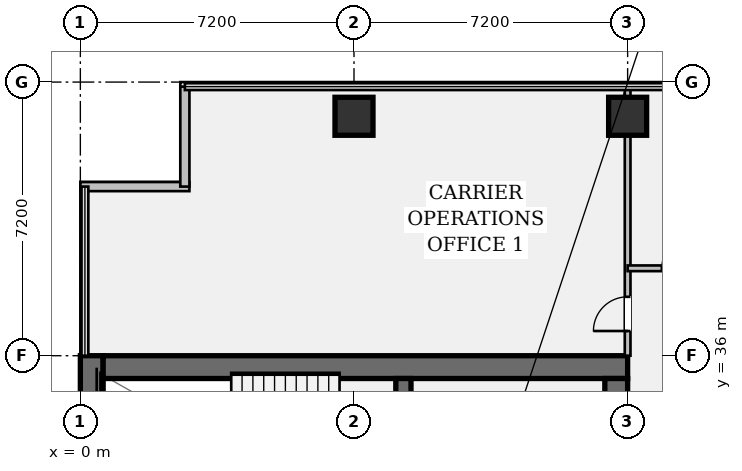
"""IFC4 building model, lengths in metres.
Left out: names, types, materials, properties, quantities, classifications, styles, units other than length and angle.
Written with IfcOpenShell. Run it as: python <this file> out.ifc"""

import sys

from ifc_helpers import new_model, si_unit, direction, frame, frame_2d, origin, origin_2d, place, context, subcontext, project, spatial, rectangle, hollow_rectangle, extrude, element, fill, save


model = new_model("IFC4")
c1 = context("Model", 3, precision=1e-05, world=origin(), true_north=direction((0.0, 1.0)))
c2 = subcontext(c1, "Body", "Model", "MODEL_VIEW")
j1 = project(units=[si_unit("LENGTHUNIT", "METRE"), si_unit("PLANEANGLEUNIT", "RADIAN")], contexts=[c1])
p1 = place(None, origin())
s1 = spatial("IfcSite", under=j1, at=p1, CompositionType="ELEMENT")
p2 = place(p1, origin())
s2 = spatial("IfcBuilding", under=s1, at=p2, CompositionType="ELEMENT")
p3 = place(p2, frame((0.0, 0.0, 46.55)))
s3 = spatial("IfcBuildingStorey", under=s2, at=p3, CompositionType="ELEMENT", Elevation=46.55)
p4 = place(p3, frame((0.3, 7.2, 0.0), z_axis=(0.0, 0.0, 1.0), x_axis=(0.0, 1.0, 0.0)))
e1 = element("IfcWall", 1, at=p4, inside=s3, PredefinedType="SHEAR", context=c2, shape_type="SweptSolid", body=[
    extrude(rectangle(XDim=28.8, YDim=0.6, at=frame_2d((14.4, 0.0))), origin(), (0.0, 0.0, 1.0), 3.57),
])
p5 = place(p3, frame((0.6, 35.7, 0.0), z_axis=(0.0, 0.0, 1.0), x_axis=(1.0, 0.0, 0.0)))
e2 = element("IfcWall", 2, at=p5, inside=s3, PredefinedType="SHEAR", context=c2, shape_type="SweptSolid", body=[
    extrude(rectangle(XDim=13.8, YDim=0.6, at=frame_2d((6.9, 0.0))), origin(), (0.0, 0.0, 1.0), 3.57),
])
p6 = place(p3, frame((14.1, 35.4, 0.0), z_axis=(0.0, 0.0, 1.0), x_axis=(0.0, -1.0, 0.0)))
e3 = element("IfcWall", 3, at=p6, inside=s3, PredefinedType="SHEAR", context=c2, shape_type="SweptSolid", body=[
    extrude(rectangle(XDim=27.6, YDim=0.6, at=frame_2d((13.8, 0.0))), origin(), (0.0, 0.0, 1.0), 3.57),
])
p7 = place(p6, frame((1.3, 0.0, 0.0)))
e4 = element("IfcOpeningElement", 4, at=p7, cuts=e3, PredefinedType="OPENING", context=c2, shape_type="SweptSolid", body=[
    extrude(rectangle(XDim=1.2, YDim=2.15, at=frame_2d((0.6, 1.075))), frame((0.0, 0.312, 0.0), z_axis=(0.0, -1.0, 0.0), x_axis=(1.0, 0.0, 0.0)), (0.0, 0.0, 1.0), 0.624),
])
p8 = place(p6, frame((25.25, 0.0, 0.0)))
e5 = element("IfcOpeningElement", 5, at=p8, cuts=e3, PredefinedType="OPENING", context=c2, shape_type="SweptSolid", body=[
    extrude(rectangle(XDim=1.2, YDim=2.15, at=frame_2d((0.6, 1.075))), frame((0.0, 0.312, 0.0), z_axis=(0.0, -1.0, 0.0), x_axis=(1.0, 0.0, 0.0)), (0.0, 0.0, 1.0), 0.624),
])
p9 = place(p6, frame((14.6, 0.0, 0.0)))
e6 = element("IfcOpeningElement", 6, at=p9, cuts=e3, PredefinedType="OPENING", context=c2, shape_type="SweptSolid", body=[
    extrude(rectangle(XDim=1.6, YDim=2.2, at=frame_2d((0.8, 1.1))), frame((0.0, 0.312, 0.0), z_axis=(0.0, -1.0, 0.0), x_axis=(1.0, 0.0, 0.0)), (0.0, 0.0, 1.0), 0.624),
])
p10 = place(p3, frame((8.5, 31.72, 0.0), z_axis=(0.0, 0.0, 1.0), x_axis=(0.0, 1.0, 0.0)))
e7 = element("IfcWall", 7, at=p10, inside=s3, PredefinedType="SHEAR", context=c2, shape_type="SweptSolid", body=[
    extrude(rectangle(XDim=3.68, YDim=0.4, at=frame_2d((1.84, 0.0))), origin(), (0.0, 0.0, 1.0), 3.57),
])
p11 = place(p10, frame((0.9, 0.0, 0.0)))
e8 = element("IfcOpeningElement", 8, at=p11, cuts=e7, PredefinedType="OPENING", context=c2, shape_type="SweptSolid", body=[
    extrude(rectangle(XDim=1.1, YDim=2.15, at=frame_2d((0.55, 1.075))), frame((0.0, 0.212, 0.0), z_axis=(0.0, -1.0, 0.0), x_axis=(1.0, 0.0, 0.0)), (0.0, 0.0, 1.0), 0.424),
])
for number, where, z_axis, x_axis in (
    (9, (7.2, 42.3, 0.0), (0.0, 0.0, 1.0), (1.0, 0.0, 0.0)),
    (10, (14.4, 42.3, 0.0), (0.0, 0.0, 1.0), (1.0, 0.0, 0.0)),
):
    element("IfcColumn", number, at=place(p3, frame(where, z_axis=z_axis, x_axis=x_axis)), inside=s3, PredefinedType="COLUMN", context=c2, shape_type="SweptSolid", body=[
        extrude(hollow_rectangle(XDim=1.0, YDim=1.0, WallThickness=0.065, at=origin_2d()), origin(), (0.0, 0.0, 1.0), 3.57),
    ])
p12 = place(p3, frame((0.0, 40.45, 0.0), z_axis=(0.0, 0.0, 1.0), x_axis=(1.0, 0.0, 0.0)))
e11 = element("IfcWall", 11, at=p12, inside=s3, PredefinedType="STANDARD", context=c2, shape_type="SweptSolid", body=[
    extrude(rectangle(XDim=2.87, YDim=0.24, at=frame_2d((1.435, 0.0))), origin(), (0.0, 0.0, 1.0), 3.57),
])
p13 = place(p3, frame((2.75, 40.45, 0.0), z_axis=(0.0, 0.0, 1.0), x_axis=(0.0, 1.0, 0.0)))
e12 = element("IfcWall", 12, at=p13, inside=s3, PredefinedType="STANDARD", context=c2, shape_type="SweptSolid", body=[
    extrude(rectangle(XDim=2.63, YDim=0.24, at=frame_2d((1.315, 0.0))), origin(), (0.0, 0.0, 1.0), 3.57),
])
p14 = place(p3, frame((14.4, 36.0, 0.0), z_axis=(0.0, 0.0, 1.0), x_axis=(0.0, 1.0, 0.0)))
e13 = element("IfcWall", 13, at=p14, inside=s3, PredefinedType="PARTITIONING", context=c2, shape_type="SweptSolid", body=[
    extrude(rectangle(XDim=7.08, YDim=0.15, at=frame_2d((3.54, 0.0))), origin(), (0.0, 0.0, 1.0), 2.699),
])
p15 = place(p14, frame((0.65, 0.0, 0.0)))
e14 = element("IfcOpeningElement", 14, at=p15, cuts=e13, PredefinedType="OPENING", context=c2, shape_type="SweptSolid", body=[
    extrude(rectangle(XDim=0.9, YDim=2.15, at=frame_2d((0.45, 1.075))), frame((0.0, 0.087, 0.0), z_axis=(0.0, -1.0, 0.0), x_axis=(1.0, 0.0, 0.0)), (0.0, 0.0, 1.0), 0.174),
])
p16 = place(p3, frame((14.4, 38.3, 0.0), z_axis=(0.0, 0.0, 1.0), x_axis=(1.0, 0.0, 0.0)))
e15 = element("IfcWall", 15, at=p16, inside=s3, PredefinedType="PARTITIONING", context=c2, shape_type="SweptSolid", body=[
    extrude(rectangle(XDim=2.95, YDim=0.15, at=frame_2d((1.475, 0.0))), origin(), (0.0, 0.0, 1.0), 2.699),
])
p17 = place(p16, frame((0.9, 0.0, 0.0)))
e16 = element("IfcOpeningElement", 16, at=p17, cuts=e15, PredefinedType="OPENING", context=c2, shape_type="SweptSolid", body=[
    extrude(rectangle(XDim=0.95, YDim=2.15, at=frame_2d((0.475, 1.075))), frame((0.0, 0.087, 0.0), z_axis=(0.0, -1.0, 0.0), x_axis=(1.0, 0.0, 0.0)), (0.0, 0.0, 1.0), 0.174),
])
p18 = place(p15, origin())
e17 = element("IfcDoor", 17, at=p18, inside=s3, OperationType="SINGLE_SWING_LEFT", PredefinedType="DOOR", context=c2, shape_type="SweptSolid", body=[
    extrude(rectangle(XDim=0.9, YDim=2.15, at=frame_2d((0.45, 1.075))), frame((0.0, 0.025, 0.0), z_axis=(0.0, -1.0, 0.0), x_axis=(1.0, 0.0, 0.0)), (0.0, 0.0, 1.0), 0.05),
])
fill(e14, e17)
p19 = place(p17, origin())
e18 = element("IfcDoor", 18, at=p19, inside=s3, OperationType="SINGLE_SWING_RIGHT", PredefinedType="DOOR", context=c2, shape_type="SweptSolid", body=[
    extrude(rectangle(XDim=0.95, YDim=2.15, at=frame_2d((0.475, 1.075))), frame((0.0, 0.025, 0.0), z_axis=(0.0, -1.0, 0.0), x_axis=(1.0, 0.0, 0.0)), (0.0, 0.0, 1.0), 0.05),
])
fill(e16, e18)
save(model, sys.argv[1])
